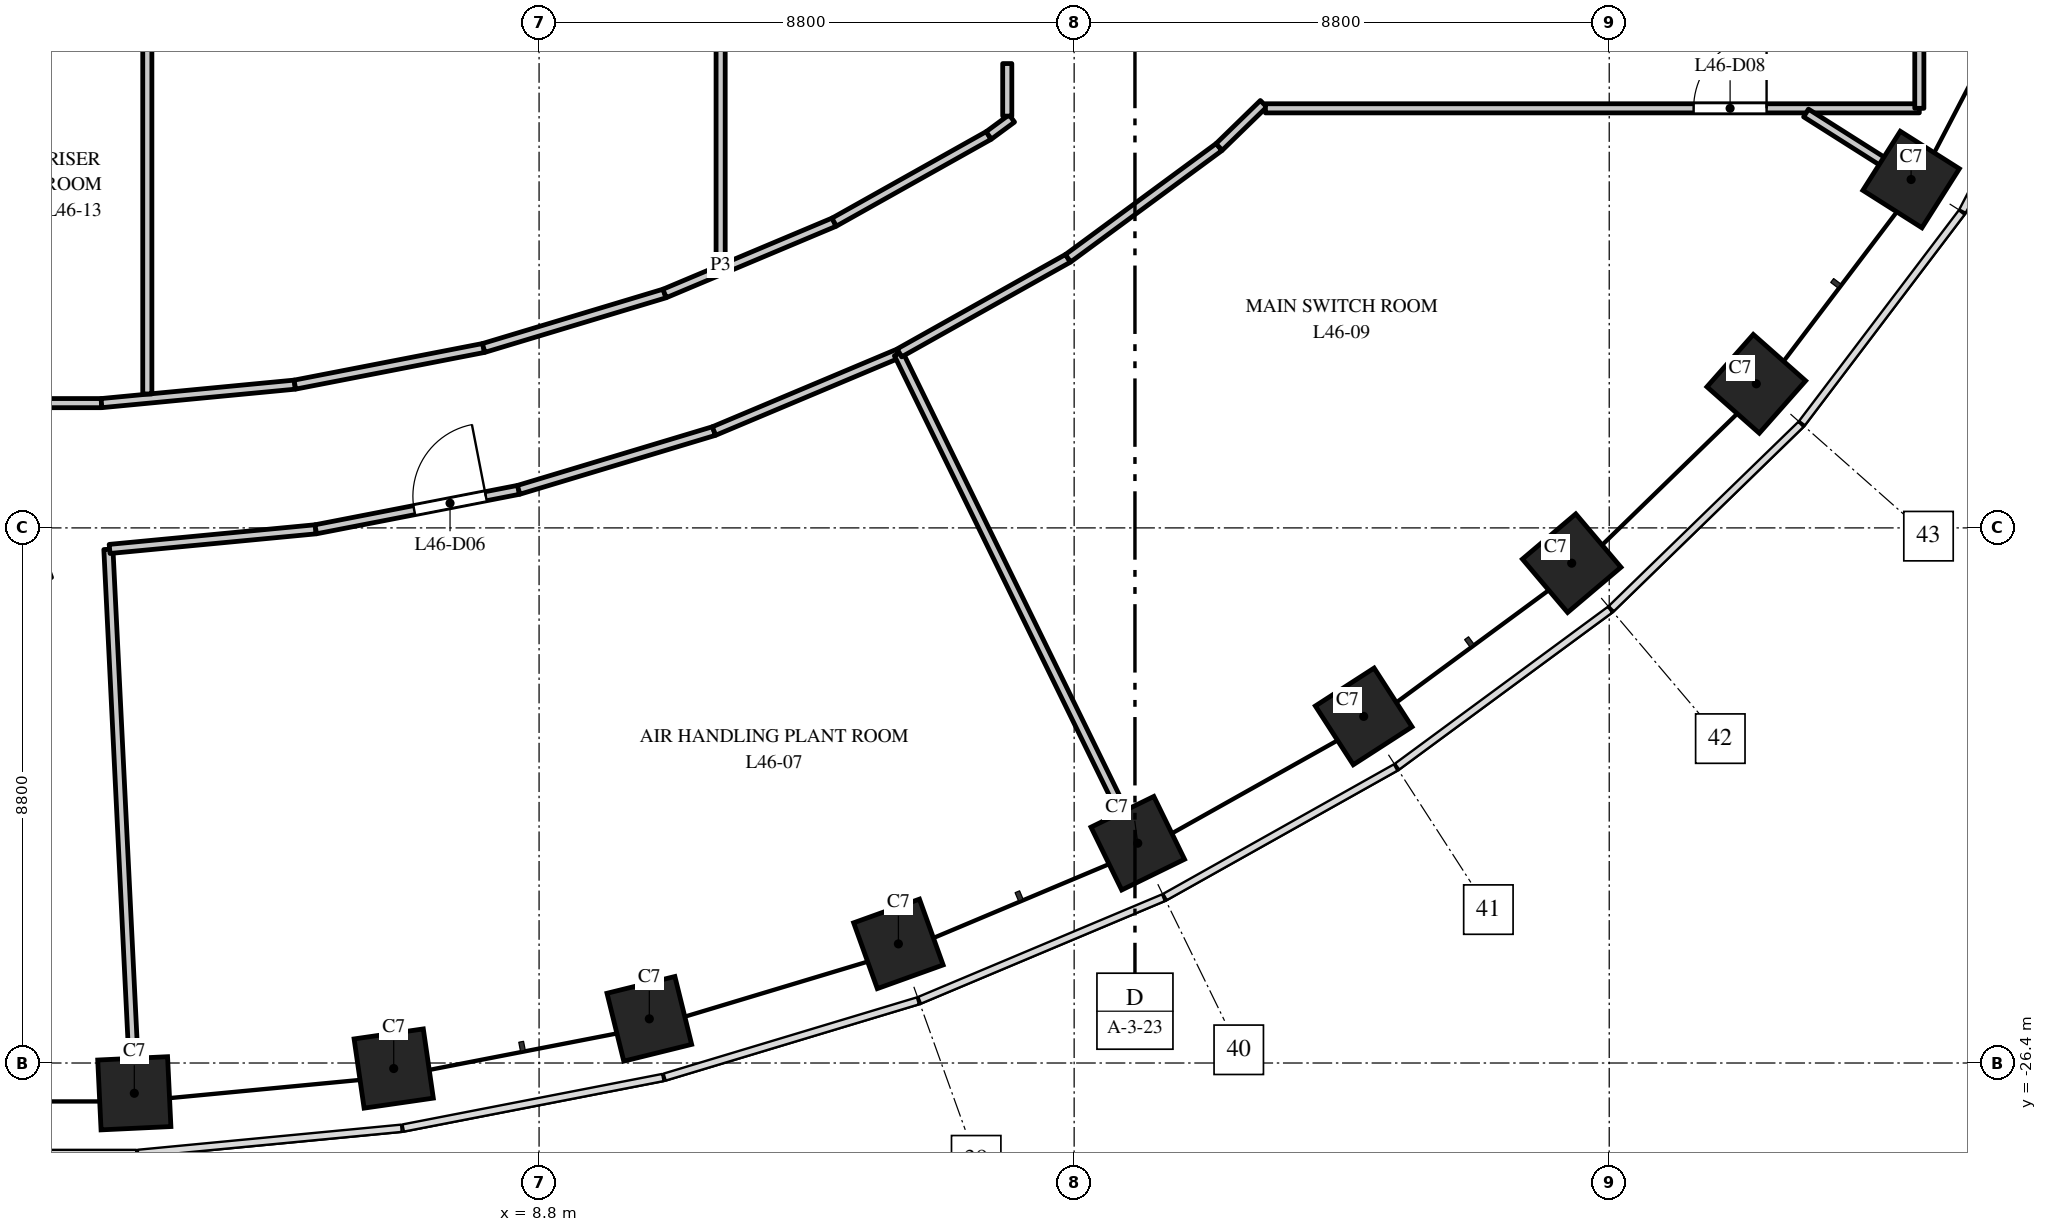
"""IFC4 building model, lengths in metres.
Left out: names, types, materials, properties, quantities, classifications, styles, units other than length and angle.
Written with IfcOpenShell. Run it as: python <this file> out.ifc"""

import sys

from ifc_helpers import new_model, si_unit, direction, frame, frame_2d, origin, origin_2d, place, context, subcontext, project, spatial, rectangle, extrude, element, fill, save


model = new_model("IFC4")
c1 = context("Model", 3, precision=1e-05, world=origin(), true_north=direction((0.0, 1.0)))
c2 = subcontext(c1, "Body", "Model", "MODEL_VIEW")
j1 = project(units=[si_unit("LENGTHUNIT", "METRE"), si_unit("PLANEANGLEUNIT", "RADIAN")], contexts=[c1])
p1 = place(None, origin())
s1 = spatial("IfcSite", under=j1, at=p1, CompositionType="ELEMENT")
p2 = place(p1, origin())
s2 = spatial("IfcBuilding", under=s1, at=p2, CompositionType="ELEMENT")
p3 = place(p2, frame((0.0, 0.0, 198.0)))
s3 = spatial("IfcBuildingStorey", under=s2, at=p3, CompositionType="ELEMENT", Elevation=198.0)
for number, where, z_axis, x_axis in (
    (1, (2.143, -26.898, 0.0), (0.0, 0.0, 1.0), (0.999, 0.048, 0.0)),
    (2, (6.409, -26.491, 0.0), (0.0, 0.0, 1.0), (0.99, 0.143, 0.0)),
    (3, (10.613, -25.674, 0.0), (0.0, 0.0, 1.0), (0.971, 0.24, 0.0)),
    (4, (14.709, -24.441, 0.0), (0.0, 0.0, 1.0), (0.941, 0.338, 0.0)),
    (5, (18.646, -22.785, 0.0), (0.0, 0.0, 1.0), (0.898, 0.439, 0.0)),
    (6, (22.362, -20.7, 0.0), (0.0, 0.0, 1.0), (0.84, 0.542, 0.0)),
    (7, (25.783, -18.18, 0.0), (0.0, 0.0, 1.0), (0.763, 0.646, 0.0)),
    (8, (28.819, -15.23, 0.0), (0.0, 0.0, 1.0), (0.663, 0.749, 0.0)),
    (9, (31.365, -11.871, 0.0), (0.0, 0.0, 1.0), (0.535, 0.845, 0.0)),
):
    element("IfcColumn", number, at=place(p3, frame(where, z_axis=z_axis, x_axis=x_axis)), inside=s3, PredefinedType="COLUMN", context=c2, shape_type="SweptSolid", body=[
        extrude(rectangle(XDim=1.15, YDim=1.15, at=origin_2d()), origin(), (0.0, 0.0, 1.0), 5.5),
    ])
p4 = place(p3, frame((-1.603, -15.548, 0.0), z_axis=(0.0, 0.0, 1.0), x_axis=(1.0, 0.0, 0.0)))
e10 = element("IfcWall", 10, at=p4, inside=s3, PredefinedType="PARTITIONING", context=c2, shape_type="SweptSolid", body=[
    extrude(rectangle(XDim=3.206, YDim=0.15, at=frame_2d((1.603, 0.0))), origin(), (0.0, 0.0, 1.0), 4.3),
])
p5 = place(p4, frame((0.556, 0.0, 0.0)))
e11 = element("IfcOpeningElement", 11, at=p5, cuts=e10, PredefinedType="OPENING", context=c2, shape_type="SweptSolid", body=[
    extrude(rectangle(XDim=1.0, YDim=2.1, at=frame_2d((0.5, 1.05))), frame((0.0, 0.085, 0.0), z_axis=(0.0, -1.0, 0.0), x_axis=(1.0, 0.0, 0.0)), (0.0, 0.0, 1.0), 0.17),
])
p6 = place(p3, frame((1.603, -15.548, 0.0), z_axis=(0.0, 0.0, 1.0), x_axis=(0.995455539839, 0.095227455097, 0.0)))
e12 = element("IfcWall", 12, at=p6, inside=s3, PredefinedType="PARTITIONING", context=c2, shape_type="SweptSolid", body=[
    extrude(rectangle(XDim=3.194, YDim=0.15, at=frame_2d((1.597, 0.0))), origin(), (0.0, 0.0, 1.0), 4.3),
])
p7 = place(p3, frame((1.717, -17.952, 0.0), z_axis=(0.0, 0.0, 1.0), x_axis=(0.049011179308, -0.998798230026, 0.0)))
e13 = element("IfcWall", 13, at=p7, inside=s3, PredefinedType="PARTITIONING", context=c2, shape_type="SweptSolid", body=[
    extrude(rectangle(XDim=9.056, YDim=0.15, at=frame_2d((4.528, 0.0))), origin(), (0.0, 0.0, 1.0), 5.15),
])
p8 = place(p3, frame((1.737, -17.946, 0.0), z_axis=(0.0, 0.0, 1.0), x_axis=(0.995491282675, 0.094853076484, 0.0)))
e14 = element("IfcWall", 14, at=p8, inside=s3, PredefinedType="PARTITIONING", context=c2, shape_type="SweptSolid", body=[
    extrude(rectangle(XDim=3.405, YDim=0.15, at=frame_2d((1.703, 0.0))), origin(), (0.0, 0.0, 1.0), 4.3),
])
p9 = place(p3, frame((2.357, -15.397, 0.0), z_axis=(0.0, 0.0, 1.0), x_axis=(0.0, 1.0, 0.0)))
e15 = element("IfcWall", 15, at=p9, inside=s3, PredefinedType="PARTITIONING", context=c2, shape_type="SweptSolid", body=[
    extrude(rectangle(XDim=8.187, YDim=0.15, at=frame_2d((4.094, 0.0))), origin(), (0.0, 0.0, 1.0), 4.3),
])
p10 = place(p3, frame((4.783, -15.244, 0.0), z_axis=(0.0, 0.0, 1.0), x_axis=(0.981672390077, 0.190576280162, 0.0)))
e16 = element("IfcWall", 16, at=p10, inside=s3, PredefinedType="PARTITIONING", context=c2, shape_type="SweptSolid", body=[
    extrude(rectangle(XDim=3.163, YDim=0.15, at=frame_2d((1.582, 0.0))), origin(), (0.0, 0.0, 1.0), 5.15),
])
p11 = place(p3, frame((5.127, -17.623, 0.0), z_axis=(0.0, 0.0, 1.0), x_axis=(0.981613520879, 0.190879269771, 0.0)))
e17 = element("IfcWall", 17, at=p11, inside=s3, PredefinedType="PARTITIONING", context=c2, shape_type="SweptSolid", body=[
    extrude(rectangle(XDim=3.4, YDim=0.15, at=frame_2d((1.7, 0.0))), origin(), (0.0, 0.0, 1.0), 5.15),
])
p12 = place(p11, frame((1.65, 0.0, 0.0)))
e18 = element("IfcOpeningElement", 18, at=p12, cuts=e17, PredefinedType="OPENING", context=c2, shape_type="SweptSolid", body=[
    extrude(rectangle(XDim=1.2, YDim=2.1, at=frame_2d((0.6, 1.05))), frame((0.0, 0.085, 0.0), z_axis=(0.0, -1.0, 0.0), x_axis=(1.0, 0.0, 0.0)), (0.0, 0.0, 1.0), 0.17),
])
p13 = place(p3, frame((7.888, -14.641, 0.0), z_axis=(0.0, 0.0, 1.0), x_axis=(0.957544770641, 0.28828460281, 0.0)))
e19 = element("IfcWall", 19, at=p13, inside=s3, PredefinedType="PARTITIONING", context=c2, shape_type="SweptSolid", body=[
    extrude(rectangle(XDim=3.108, YDim=0.15, at=frame_2d((1.554, 0.0))), origin(), (0.0, 0.0, 1.0), 4.3),
])
p14 = place(p3, frame((8.464, -16.974, 0.0), z_axis=(0.0, 0.0, 1.0), x_axis=(0.957565546192, 0.28821558727, 0.0)))
e20 = element("IfcWall", 20, at=p14, inside=s3, PredefinedType="PARTITIONING", context=c2, shape_type="SweptSolid", body=[
    extrude(rectangle(XDim=3.355, YDim=0.15, at=frame_2d((1.678, 0.0))), origin(), (0.0, 0.0, 1.0), 4.3),
])
p15 = place(p3, frame((10.864, -13.745, 0.0), z_axis=(0.0, 0.0, 1.0), x_axis=(0.92178263598, 0.387707069843, 0.0)))
e21 = element("IfcWall", 21, at=p15, inside=s3, PredefinedType="PARTITIONING", context=c2, shape_type="SweptSolid", body=[
    extrude(rectangle(XDim=3.026, YDim=0.15, at=frame_2d((1.513, 0.0))), origin(), (0.0, 0.0, 1.0), 5.15),
])
p16 = place(p3, frame((11.677, -16.007, 0.0), z_axis=(0.0, 0.0, 1.0), x_axis=(0.921795970681, 0.387675364753, 0.0)))
e22 = element("IfcWall", 22, at=p16, inside=s3, PredefinedType="PARTITIONING", context=c2, shape_type="SweptSolid", body=[
    extrude(rectangle(XDim=3.289, YDim=0.15, at=frame_2d((1.645, 0.0))), origin(), (0.0, 0.0, 1.0), 5.15),
])
p17 = place(p3, frame((11.786, -13.273, 0.0), z_axis=(0.0, 0.0, 1.0), x_axis=(0.0, 1.0, 0.0)))
e23 = element("IfcWall", 23, at=p17, inside=s3, PredefinedType="PARTITIONING", context=c2, shape_type="SweptSolid", body=[
    extrude(rectangle(XDim=26.546, YDim=0.15, at=frame_2d((13.273, 0.0))), origin(), (0.0, 0.0, 1.0), 4.2),
])
p18 = place(p3, frame((13.653, -12.572, 0.0), z_axis=(0.0, 0.0, 1.0), x_axis=(0.872138682379, 0.48925874412, 0.0)))
e24 = element("IfcWall", 24, at=p18, inside=s3, PredefinedType="PARTITIONING", context=c2, shape_type="SweptSolid", body=[
    extrude(rectangle(XDim=2.915, YDim=0.15, at=frame_2d((1.457, 0.0))), origin(), (0.0, 0.0, 1.0), 5.15),
])
p19 = place(p3, frame((14.711, -14.736, 0.0), z_axis=(0.0, 0.0, 1.0), x_axis=(0.439208198665, -0.898385306105, 0.0)))
e25 = element("IfcWall", 25, at=p19, inside=s3, PredefinedType="PARTITIONING", context=c2, shape_type="SweptSolid", body=[
    extrude(rectangle(XDim=9.06, YDim=0.15, at=frame_2d((4.53, 0.0))), origin(), (0.0, 0.0, 1.0), 5.15),
])
p20 = place(p3, frame((14.726, -14.722, 0.0), z_axis=(0.0, 0.0, 1.0), x_axis=(0.872095890511, 0.489335015868, 0.0)))
e26 = element("IfcWall", 26, at=p20, inside=s3, PredefinedType="PARTITIONING", context=c2, shape_type="SweptSolid", body=[
    extrude(rectangle(XDim=3.18, YDim=0.15, at=frame_2d((1.59, 0.0))), origin(), (0.0, 0.0, 1.0), 5.15),
])
p21 = place(p3, frame((16.195, -11.146, 0.0), z_axis=(0.0, 0.0, 1.0), x_axis=(0.804938799391, 0.593357842482, 0.0)))
e27 = element("IfcWall", 27, at=p21, inside=s3, PredefinedType="PARTITIONING", context=c2, shape_type="SweptSolid", body=[
    extrude(rectangle(XDim=0.472, YDim=0.15, at=frame_2d((0.236, 0.0))), origin(), (0.0, 0.0, 1.0), 5.15),
])
p22 = place(p3, frame((16.5, -10.828, 0.0), z_axis=(0.0, 0.0, 1.0), x_axis=(0.0, 1.0, 0.0)))
e28 = element("IfcWall", 28, at=p22, inside=s3, PredefinedType="PARTITIONING", context=c2, shape_type="SweptSolid", body=[
    extrude(rectangle(XDim=0.864, YDim=0.15, at=frame_2d((0.432, 0.0))), origin(), (0.0, 0.0, 1.0), 5.15),
])
p23 = place(p3, frame((17.499, -13.166, 0.0), z_axis=(0.0, 0.0, 1.0), x_axis=(0.805191029373, 0.593015519373, 0.0)))
e29 = element("IfcWall", 29, at=p23, inside=s3, PredefinedType="PARTITIONING", context=c2, shape_type="SweptSolid", body=[
    extrude(rectangle(XDim=3.086, YDim=0.15, at=frame_2d((1.543, 0.0))), origin(), (0.0, 0.0, 1.0), 5.15),
])
p24 = place(p3, frame((19.984, -11.336, 0.0), z_axis=(0.0, 0.0, 1.0), x_axis=(0.716971653665, 0.697102322361, 0.0)))
e30 = element("IfcWall", 30, at=p24, inside=s3, PredefinedType="PARTITIONING", context=c2, shape_type="SweptSolid", body=[
    extrude(rectangle(XDim=1.02, YDim=0.15, at=frame_2d((0.51, 0.0))), origin(), (0.0, 0.0, 1.0), 4.2),
])
p25 = place(p3, frame((20.746, -10.7, 0.0), z_axis=(0.0, 0.0, 1.0), x_axis=(1.0, 0.0, 0.0)))
e31 = element("IfcWall", 31, at=p25, inside=s3, PredefinedType="PARTITIONING", context=c2, shape_type="SweptSolid", body=[
    extrude(rectangle(XDim=10.754, YDim=0.15, at=frame_2d((5.377, 0.0))), origin(), (0.0, 0.0, 1.0), 5.15),
])
p26 = place(p25, frame((7.042, 0.0, 0.0)))
e32 = element("IfcOpeningElement", 32, at=p26, cuts=e31, PredefinedType="OPENING", context=c2, shape_type="SweptSolid", body=[
    extrude(rectangle(XDim=1.2, YDim=2.1, at=frame_2d((0.6, 1.05))), frame((0.0, 0.085, 0.0), z_axis=(0.0, -1.0, 0.0), x_axis=(1.0, 0.0, 0.0)), (0.0, 0.0, 1.0), 0.17),
])
p27 = place(p3, frame((29.637, -10.777, 0.0), z_axis=(0.0, 0.0, 1.0), x_axis=(0.844747041197, -0.535165802709, 0.0)))
e33 = element("IfcWall", 33, at=p27, inside=s3, PredefinedType="PARTITIONING", context=c2, shape_type="SweptSolid", body=[
    extrude(rectangle(XDim=2.145, YDim=0.15, at=frame_2d((1.073, 0.0))), origin(), (0.0, 0.0, 1.0), 5.15),
])
p28 = place(p3, frame((31.5, -10.7, 0.0), z_axis=(0.0, 0.0, 1.0), x_axis=(0.0, 1.0, 0.0)))
e34 = element("IfcWall", 34, at=p28, inside=s3, PredefinedType="PARTITIONING", context=c2, shape_type="SweptSolid", body=[
    extrude(rectangle(XDim=2.2, YDim=0.15, at=frame_2d((1.1, 0.0))), origin(), (0.0, 0.0, 1.0), 5.15),
])
p29 = place(p12, origin())
e35 = element("IfcDoor", 35, at=p29, inside=s3, OperationType="SINGLE_SWING_RIGHT", PredefinedType="DOOR", context=c2, shape_type="SweptSolid", body=[
    extrude(rectangle(XDim=1.2, YDim=2.1, at=frame_2d((0.6, 1.05))), frame((0.0, 0.025, 0.0), z_axis=(0.0, -1.0, 0.0), x_axis=(1.0, 0.0, 0.0)), (0.0, 0.0, 1.0), 0.05),
])
fill(e18, e35)
p30 = place(p26, origin())
e36 = element("IfcDoor", 36, at=p30, inside=s3, OperationType="SINGLE_SWING_RIGHT", PredefinedType="DOOR", context=c2, shape_type="SweptSolid", body=[
    extrude(rectangle(XDim=1.2, YDim=2.1, at=frame_2d((0.6, 1.05))), frame((0.0, 0.025, 0.0), z_axis=(0.0, -1.0, 0.0), x_axis=(1.0, 0.0, 0.0)), (0.0, 0.0, 1.0), 0.05),
])
fill(e32, e36)
save(model, sys.argv[1])
